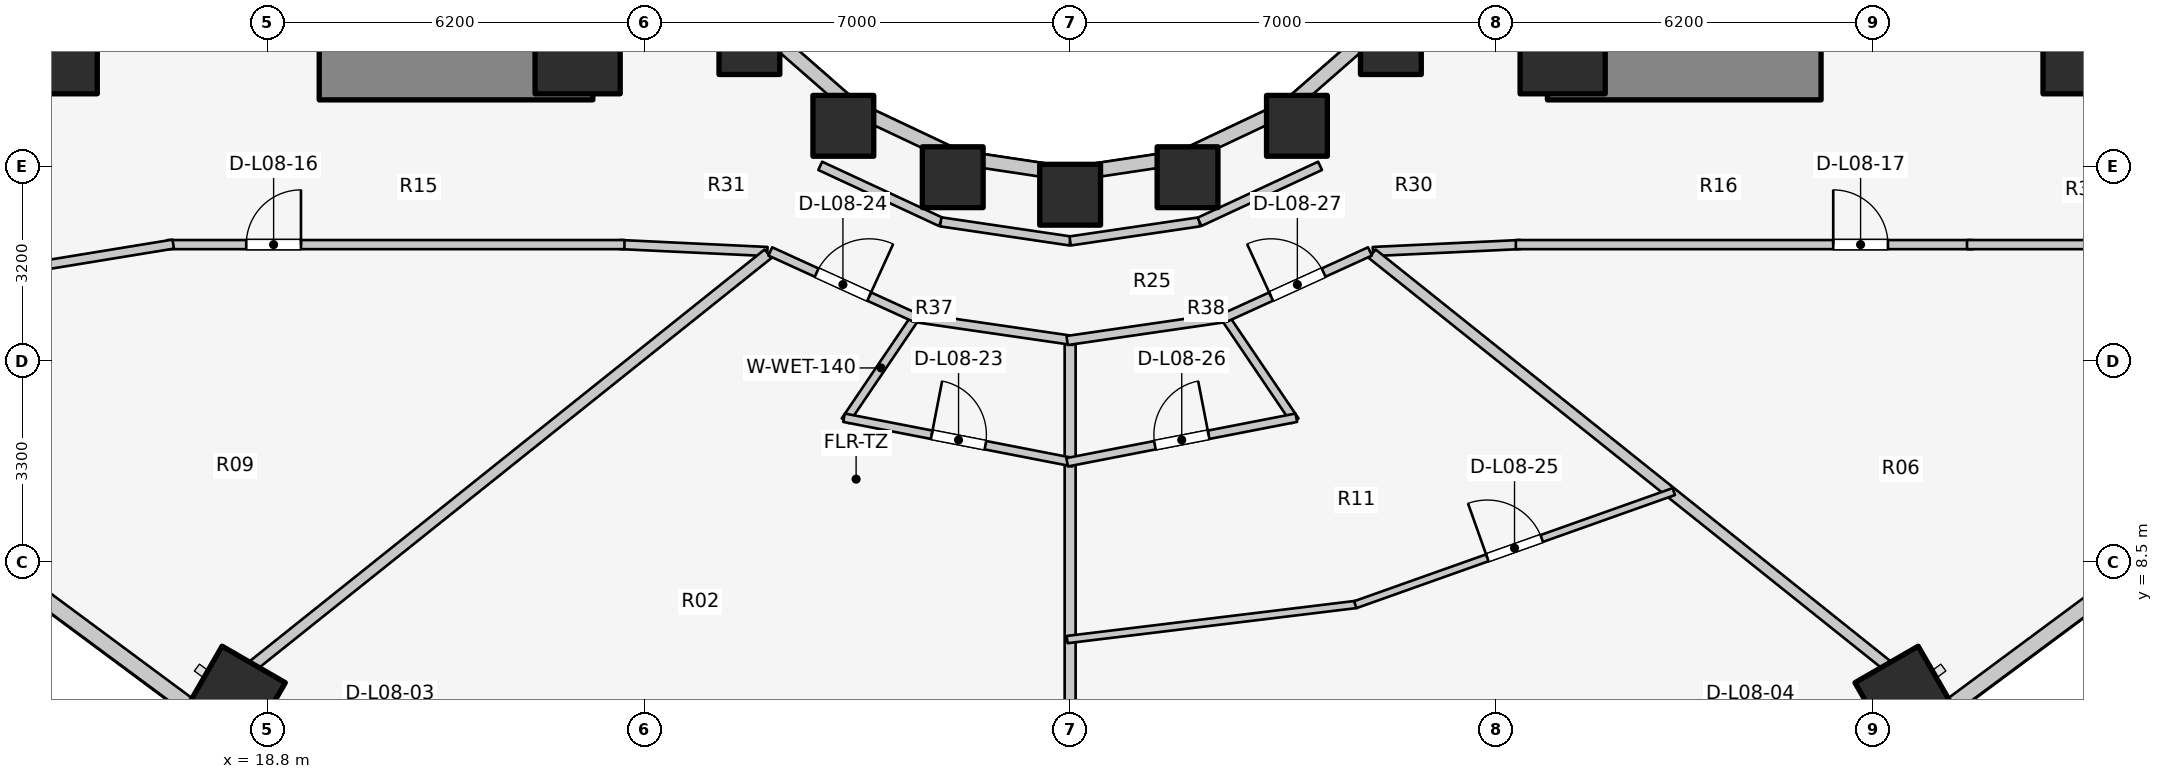
"""IFC4 building model, lengths in metres.
Left out: names, types, materials, properties, quantities, classifications, styles, units other than length and angle.
Written with IfcOpenShell. Run it as: python <this file> out.ifc"""

import sys

from ifc_helpers import new_model, si_unit, direction, frame, frame_2d, origin, origin_2d, place, context, subcontext, project, spatial, rectangle, extrude, element, fill, save


model = new_model("IFC4")
c1 = context("Model", 3, precision=1e-05, world=origin(), true_north=direction((0.0, 1.0)))
c2 = subcontext(c1, "Body", "Model", "MODEL_VIEW")
j1 = project(units=[si_unit("LENGTHUNIT", "METRE"), si_unit("PLANEANGLEUNIT", "RADIAN")], contexts=[c1])
p1 = place(None, origin())
s1 = spatial("IfcSite", under=j1, at=p1, CompositionType="ELEMENT")
p2 = place(p1, origin())
s2 = spatial("IfcBuilding", under=s1, at=p2, CompositionType="ELEMENT")
p3 = place(p2, frame((0.0, 0.0, 30.7)))
s3 = spatial("IfcBuildingStorey", under=s2, at=p3, CompositionType="ELEMENT", Elevation=30.7)
for number, where, z_axis, x_axis in (
    (1, (19.65, 16.55, 0.0), (0.0, 0.0, 1.0), (1.0, 0.0, 0.0)),
    (2, (39.85, 16.55, 0.0), (0.0, 0.0, 1.0), (1.0, 0.0, 0.0)),
):
    element("IfcWall", number, at=place(p3, frame(where, z_axis=z_axis, x_axis=x_axis)), inside=s3, PredefinedType="SHEAR", context=c2, shape_type="SweptSolid", body=[
        extrude(rectangle(XDim=4.5, YDim=0.9, at=frame_2d((2.25, 0.0))), origin(), (0.0, 0.0, 1.0), 3.1),
    ])
for number, where, z_axis, x_axis in (
    (3, (15.3, 16.9, 0.0), (0.0, 0.0, 1.0), (1.0, 0.0, 0.0)),
    (4, (23.9, 16.9, 0.0), (0.0, 0.0, 1.0), (1.0, 0.0, 0.0)),
    (5, (40.1, 16.9, 0.0), (0.0, 0.0, 1.0), (1.0, 0.0, 0.0)),
    (6, (48.7, 16.9, 0.0), (0.0, 0.0, 1.0), (1.0, 0.0, 0.0)),
):
    element("IfcColumn", number, at=place(p3, frame(where, z_axis=z_axis, x_axis=x_axis)), inside=s3, PredefinedType="COLUMN", context=c2, shape_type="SweptSolid", body=[
        extrude(rectangle(XDim=1.4, YDim=1.4, at=origin_2d()), origin(), (0.0, 0.0, 1.0), 3.1),
    ])
for number, where, z_axis, x_axis in (
    (7, (26.725, 17.018, 0.0), (0.0, 0.0, 1.0), (1.0, 0.0, 0.0)),
    (8, (28.27, 15.673, 0.0), (0.0, 0.0, 1.0), (1.0, 0.0, 0.0)),
):
    element("IfcColumn", number, at=place(p3, frame(where, z_axis=z_axis, x_axis=x_axis)), inside=s3, PredefinedType="COLUMN", context=c2, shape_type="SweptSolid", body=[
        extrude(rectangle(XDim=1.0, YDim=1.0, at=origin_2d()), origin(), (0.0, 0.0, 1.0), 3.1),
    ])
p4 = place(p3, frame((18.273, 6.296, 0.0), z_axis=(0.0, 0.0, 1.0), x_axis=(-0.5, -0.866025403784, 0.0)))
e9 = element("IfcColumn", 9, at=p4, inside=s3, PredefinedType="COLUMN", context=c2, shape_type="SweptSolid", body=[
    extrude(rectangle(XDim=1.2, YDim=1.2, at=origin_2d()), origin(), (0.0, 0.0, 1.0), 3.1),
])
for number, where, z_axis, x_axis in (
    (10, (30.069, 14.828, 0.0), (0.0, 0.0, 1.0), (1.0, 0.0, 0.0)),
    (11, (32.0, 14.54, 0.0), (0.0, 0.0, 1.0), (1.0, 0.0, 0.0)),
    (12, (33.931, 14.828, 0.0), (0.0, 0.0, 1.0), (1.0, 0.0, 0.0)),
    (13, (35.73, 15.673, 0.0), (0.0, 0.0, 1.0), (1.0, 0.0, 0.0)),
):
    element("IfcColumn", number, at=place(p3, frame(where, z_axis=z_axis, x_axis=x_axis)), inside=s3, PredefinedType="COLUMN", context=c2, shape_type="SweptSolid", body=[
        extrude(rectangle(XDim=1.0, YDim=1.0, at=origin_2d()), origin(), (0.0, 0.0, 1.0), 3.1),
    ])
p5 = place(p3, frame((45.727, 6.296, 0.0), z_axis=(0.0, 0.0, 1.0), x_axis=(0.5, -0.866025403784, 0.0)))
e14 = element("IfcColumn", 14, at=p5, inside=s3, PredefinedType="COLUMN", context=c2, shape_type="SweptSolid", body=[
    extrude(rectangle(XDim=1.2, YDim=1.2, at=origin_2d()), origin(), (0.0, 0.0, 1.0), 3.1),
])
p6 = place(p3, frame((37.275, 17.018, 0.0), z_axis=(0.0, 0.0, 1.0), x_axis=(1.0, 0.0, 0.0)))
e15 = element("IfcColumn", 15, at=p6, inside=s3, PredefinedType="COLUMN", context=c2, shape_type="SweptSolid", body=[
    extrude(rectangle(XDim=1.0, YDim=1.0, at=origin_2d()), origin(), (0.0, 0.0, 1.0), 3.1),
])
p7 = place(p3, frame((26.965, 17.258, 0.0), z_axis=(0.0, 0.0, 1.0), x_axis=(0.752576694707, -0.658504607869, 0.0)))
e16 = element("IfcWall", 16, at=p7, inside=s3, PredefinedType="STANDARD", context=c2, shape_type="SweptSolid", body=[
    extrude(rectangle(XDim=1.959, YDim=0.23, at=frame_2d((0.98, 0.0))), origin(), (0.0, 0.0, 1.0), 2.16),
])
p8 = place(p3, frame((28.44, 15.968, 0.0), z_axis=(0.0, 0.0, 1.0), x_axis=(0.904179699603, -0.427152280606, 0.0)))
e17 = element("IfcWall", 17, at=p8, inside=s3, PredefinedType="STANDARD", context=c2, shape_type="SweptSolid", body=[
    extrude(rectangle(XDim=1.899, YDim=0.23, at=frame_2d((0.95, 0.0))), origin(), (0.0, 0.0, 1.0), 2.16),
])
for number, where, z_axis, x_axis in (
    (18, (30.157, 15.157, 0.0), (0.0, 0.0, 1.0), (0.989, -0.149, 0.0)),
    (19, (32.0, 14.88, 0.0), (0.0, 0.0, 1.0), (0.989, 0.149, 0.0)),
):
    element("IfcWall", number, at=place(p3, frame(where, z_axis=z_axis, x_axis=x_axis)), inside=s3, PredefinedType="STANDARD", context=c2, shape_type="SweptSolid", body=[
        extrude(rectangle(XDim=1.864, YDim=0.23, at=frame_2d((0.932, 0.0))), origin(), (0.0, 0.0, 1.0), 2.16),
    ])
p9 = place(p3, frame((33.843, 15.157, 0.0), z_axis=(0.0, 0.0, 1.0), x_axis=(0.904179699603, 0.427152280606, 0.0)))
e20 = element("IfcWall", 20, at=p9, inside=s3, PredefinedType="STANDARD", context=c2, shape_type="SweptSolid", body=[
    extrude(rectangle(XDim=1.899, YDim=0.23, at=frame_2d((0.95, 0.0))), origin(), (0.0, 0.0, 1.0), 2.16),
])
p10 = place(p3, frame((35.56, 15.968, 0.0), z_axis=(0.0, 0.0, 1.0), x_axis=(0.752576694707, 0.658504607869, 0.0)))
e21 = element("IfcWall", 21, at=p10, inside=s3, PredefinedType="STANDARD", context=c2, shape_type="SweptSolid", body=[
    extrude(rectangle(XDim=1.959, YDim=0.23, at=frame_2d((0.98, 0.0))), origin(), (0.0, 0.0, 1.0), 2.16),
])
for number, where, z_axis, x_axis in (
    (22, (13.595, 9.035, 0.0), (0.0, 0.0, 1.0), (0.803, -0.595, 0.0)),
    (23, (46.042, 5.803, 0.0), (0.0, 0.0, 1.0), (0.803, 0.595, 0.0)),
):
    element("IfcWall", number, at=place(p3, frame(where, z_axis=z_axis, x_axis=x_axis)), inside=s3, PredefinedType="STANDARD", context=c2, shape_type="SweptSolid", body=[
        extrude(rectangle(XDim=5.43, YDim=0.26, at=frame_2d((2.715, 0.0))), origin(), (0.0, 0.0, 1.0), 2.85),
    ])
p11 = place(p3, frame((27.89, 15.015, 0.0), z_axis=(0.0, 0.0, 1.0), x_axis=(0.906943449489, -0.421252393975, 0.0)))
e24 = element("IfcWall", 24, at=p11, inside=s3, PredefinedType="PARTITIONING", context=c2, shape_type="SweptSolid", body=[
    extrude(rectangle(XDim=2.186, YDim=0.15, at=frame_2d((1.093, 0.0))), origin(), (0.0, 0.0, 1.0), 2.237),
])
for number, where, z_axis, x_axis in (
    (25, (29.873, 14.094, 0.0), (0.0, 0.0, 1.0), (0.989, -0.146, 0.0)),
    (26, (32.0, 13.78, 0.0), (0.0, 0.0, 1.0), (0.989, 0.146, 0.0)),
):
    element("IfcWall", number, at=place(p3, frame(where, z_axis=z_axis, x_axis=x_axis)), inside=s3, PredefinedType="PARTITIONING", context=c2, shape_type="SweptSolid", body=[
        extrude(rectangle(XDim=2.151, YDim=0.15, at=frame_2d((1.075, 0.0))), origin(), (0.0, 0.0, 1.0), 2.237),
    ])
p12 = place(p3, frame((34.127, 14.094, 0.0), z_axis=(0.0, 0.0, 1.0), x_axis=(0.906943449489, 0.421252393975, 0.0)))
e27 = element("IfcWall", 27, at=p12, inside=s3, PredefinedType="PARTITIONING", context=c2, shape_type="SweptSolid", body=[
    extrude(rectangle(XDim=2.186, YDim=0.15, at=frame_2d((1.093, 0.0))), origin(), (0.0, 0.0, 1.0), 2.237),
])
p13 = place(p3, frame((27.02, 13.606, 0.0), z_axis=(0.0, 0.0, 1.0), x_axis=(-0.998877427952, 0.047369651964, 0.0)))
e28 = element("IfcWall", 28, at=p13, inside=s3, PredefinedType="PARTITIONING", context=c2, shape_type="SweptSolid", body=[
    extrude(rectangle(XDim=2.433, YDim=0.15, at=frame_2d((1.216, 0.0))), origin(), (0.0, 0.0, 1.0), 2.237),
])
p14 = place(p3, frame((17.15, 13.72, 0.0), z_axis=(0.0, 0.0, 1.0), x_axis=(1.0, 0.0, 0.0)))
e29 = element("IfcWall", 29, at=p14, inside=s3, PredefinedType="PARTITIONING", context=c2, shape_type="SweptSolid", body=[
    extrude(rectangle(XDim=7.52, YDim=0.15, at=frame_2d((3.76, 0.0))), origin(), (0.0, 0.0, 1.0), 2.237),
])
p15 = place(p14, frame((1.3, 0.0, 0.0)))
e30 = element("IfcOpeningElement", 30, at=p15, cuts=e29, PredefinedType="OPENING", context=c2, shape_type="SweptSolid", body=[
    extrude(rectangle(XDim=0.9, YDim=2.1, at=frame_2d((0.45, 1.05))), frame((0.0, 0.085, 0.0), z_axis=(0.0, -1.0, 0.0), x_axis=(1.0, 0.0, 0.0)), (0.0, 0.0, 1.0), 0.17),
])
p16 = place(p3, frame((17.249, 13.728, 0.0), z_axis=(0.0, 0.0, 1.0), x_axis=(-0.98693078372, -0.161144742846, 0.0)))
e31 = element("IfcWall", 31, at=p16, inside=s3, PredefinedType="PARTITIONING", context=c2, shape_type="SweptSolid", body=[
    extrude(rectangle(XDim=7.557, YDim=0.15, at=frame_2d((3.779, 0.0))), origin(), (0.0, 0.0, 1.0), 2.069),
])
p17 = place(p3, frame((36.98, 13.606, 0.0), z_axis=(0.0, 0.0, 1.0), x_axis=(0.998877427952, 0.047369651964, 0.0)))
e32 = element("IfcWall", 32, at=p17, inside=s3, PredefinedType="PARTITIONING", context=c2, shape_type="SweptSolid", body=[
    extrude(rectangle(XDim=2.433, YDim=0.15, at=frame_2d((1.216, 0.0))), origin(), (0.0, 0.0, 1.0), 2.237),
])
p18 = place(p3, frame((39.33, 13.72, 0.0), z_axis=(0.0, 0.0, 1.0), x_axis=(1.0, 0.0, 0.0)))
e33 = element("IfcWall", 33, at=p18, inside=s3, PredefinedType="PARTITIONING", context=c2, shape_type="SweptSolid", body=[
    extrude(rectangle(XDim=7.52, YDim=0.15, at=frame_2d((3.76, 0.0))), origin(), (0.0, 0.0, 1.0), 2.237),
])
p19 = place(p18, frame((5.22, 0.0, 0.0)))
e34 = element("IfcOpeningElement", 34, at=p19, cuts=e33, PredefinedType="OPENING", context=c2, shape_type="SweptSolid", body=[
    extrude(rectangle(XDim=0.9, YDim=2.1, at=frame_2d((0.45, 1.05))), frame((0.0, 0.085, 0.0), z_axis=(0.0, -1.0, 0.0), x_axis=(1.0, 0.0, 0.0)), (0.0, 0.0, 1.0), 0.17),
])
p20 = place(p3, frame((46.75, 13.72, 0.0), z_axis=(0.0, 0.0, 1.0), x_axis=(1.0, 0.0, 0.0)))
e35 = element("IfcWall", 35, at=p20, inside=s3, PredefinedType="PARTITIONING", context=c2, shape_type="SweptSolid", body=[
    extrude(rectangle(XDim=5.05, YDim=0.15, at=frame_2d((2.525, 0.0))), origin(), (0.0, 0.0, 1.0), 2.069),
])
p21 = place(p3, frame((27.032, 13.569, 0.0), z_axis=(0.0, 0.0, 1.0), x_axis=(-0.781055486744, -0.624461629428, 0.0)))
e36 = element("IfcWall", 36, at=p21, inside=s3, PredefinedType="PARTITIONING", context=c2, shape_type="SweptSolid", body=[
    extrude(rectangle(XDim=10.843, YDim=0.18, at=frame_2d((5.422, 0.0))), origin(), (0.0, 0.0, 1.0), 2.237),
])
p22 = place(p3, frame((32.0, 12.095, 0.0), z_axis=(0.0, 0.0, 1.0), x_axis=(0.0, -1.0, 0.0)))
e37 = element("IfcWall", 37, at=p22, inside=s3, PredefinedType="PARTITIONING", context=c2, shape_type="SweptSolid", body=[
    extrude(rectangle(XDim=8.395, YDim=0.18, at=frame_2d((4.198, 0.0))), origin(), (0.0, 0.0, 1.0), 2.237),
])
p23 = place(p3, frame((36.968, 13.569, 0.0), z_axis=(0.0, 0.0, 1.0), x_axis=(0.781055486744, -0.624461629428, 0.0)))
e38 = element("IfcWall", 38, at=p23, inside=s3, PredefinedType="PARTITIONING", context=c2, shape_type="SweptSolid", body=[
    extrude(rectangle(XDim=10.843, YDim=0.18, at=frame_2d((5.422, 0.0))), origin(), (0.0, 0.0, 1.0), 2.237),
])
p24 = place(p3, frame((29.401, 12.527, 0.0), z_axis=(0.0, 0.0, 1.0), x_axis=(0.989649898776, -0.143502884474, 0.0)))
e39 = element("IfcWall", 39, at=p24, inside=s3, PredefinedType="PARTITIONING", context=c2, shape_type="SweptSolid", body=[
    extrude(rectangle(XDim=2.676, YDim=0.15, at=frame_2d((1.338, 0.0))), origin(), (0.0, 0.0, 1.0), 2.237),
])
p25 = place(p3, frame((29.479, 12.561, 0.0), z_axis=(0.0, 0.0, 1.0), x_axis=(-0.56056273171, -0.828111963335, 0.0)))
e40 = element("IfcWall", 40, at=p25, inside=s3, PredefinedType="PLUMBINGWALL", context=c2, shape_type="SweptSolid", body=[
    extrude(rectangle(XDim=2.1, YDim=0.14, at=frame_2d((1.05, 0.0))), origin(), (0.0, 0.0, 1.0), 2.855),
])
p26 = place(p3, frame((28.28, 10.873, 0.0), z_axis=(0.0, 0.0, 1.0), x_axis=(0.981623000654, -0.190830512727, 0.0)))
e41 = element("IfcWall", 41, at=p26, inside=s3, PredefinedType="PLUMBINGWALL", context=c2, shape_type="SweptSolid", body=[
    extrude(rectangle(XDim=3.839, YDim=0.14, at=frame_2d((1.92, 0.0))), origin(), (0.0, 0.0, 1.0), 2.237),
])
p27 = place(p26, frame((1.47, 0.0, 0.0)))
e42 = element("IfcOpeningElement", 42, at=p27, cuts=e41, PredefinedType="OPENING", context=c2, shape_type="SweptSolid", body=[
    extrude(rectangle(XDim=0.9, YDim=2.1, at=frame_2d((0.45, 1.05))), frame((0.0, 0.08, 0.0), z_axis=(0.0, -1.0, 0.0), x_axis=(1.0, 0.0, 0.0)), (0.0, 0.0, 1.0), 0.16),
])
p28 = place(p3, frame((27.069, 13.607, 0.0), z_axis=(0.0, 0.0, 1.0), x_axis=(0.909747571199, -0.415161843982, 0.0)))
e43 = element("IfcWall", 43, at=p28, inside=s3, PredefinedType="PARTITIONING", context=c2, shape_type="SweptSolid", body=[
    extrude(rectangle(XDim=2.625, YDim=0.15, at=frame_2d((1.312, 0.0))), origin(), (0.0, 0.0, 1.0), 2.237),
])
p29 = place(p28, frame((0.838, 0.0, 0.0)))
e44 = element("IfcOpeningElement", 44, at=p29, cuts=e43, PredefinedType="OPENING", context=c2, shape_type="SweptSolid", body=[
    extrude(rectangle(XDim=0.95, YDim=2.1, at=frame_2d((0.475, 1.05))), frame((0.0, 0.085, 0.0), z_axis=(0.0, -1.0, 0.0), x_axis=(1.0, 0.0, 0.0)), (0.0, 0.0, 1.0), 0.17),
])
p30 = place(p3, frame((31.95, 7.225, 0.0), z_axis=(0.0, 0.0, 1.0), x_axis=(0.992699076447, 0.120617343785, 0.0)))
e45 = element("IfcWall", 45, at=p30, inside=s3, PredefinedType="MOVABLE", context=c2, shape_type="SweptSolid", body=[
    extrude(rectangle(XDim=4.793, YDim=0.12, at=frame_2d((2.396, 0.0))), origin(), (0.0, 0.0, 1.0), 2.237),
])
p31 = place(p3, frame((36.689, 7.798, 0.0), z_axis=(0.0, 0.0, 1.0), x_axis=(0.942369240096, 0.334574678243, 0.0)))
e46 = element("IfcWall", 46, at=p31, inside=s3, PredefinedType="MOVABLE", context=c2, shape_type="SweptSolid", body=[
    extrude(rectangle(XDim=5.559, YDim=0.12, at=frame_2d((2.779, 0.0))), origin(), (0.0, 0.0, 1.0), 2.237),
])
p32 = place(p31, frame((2.304, 0.0, 0.0)))
e47 = element("IfcOpeningElement", 47, at=p32, cuts=e46, PredefinedType="OPENING", context=c2, shape_type="SweptSolid", body=[
    extrude(rectangle(XDim=0.95, YDim=2.1, at=frame_2d((0.475, 1.05))), frame((0.0, 0.07, 0.0), z_axis=(0.0, -1.0, 0.0), x_axis=(1.0, 0.0, 0.0)), (0.0, 0.0, 1.0), 0.14),
])
p33 = place(p3, frame((31.95, 12.143, 0.0), z_axis=(0.0, 0.0, 1.0), x_axis=(0.989649898776, 0.143502884474, 0.0)))
e48 = element("IfcWall", 48, at=p33, inside=s3, PredefinedType="PARTITIONING", context=c2, shape_type="SweptSolid", body=[
    extrude(rectangle(XDim=2.676, YDim=0.15, at=frame_2d((1.338, 0.0))), origin(), (0.0, 0.0, 1.0), 2.237),
])
p34 = place(p3, frame((34.521, 12.561, 0.0), z_axis=(0.0, 0.0, 1.0), x_axis=(0.56056273171, -0.828111963335, 0.0)))
e49 = element("IfcWall", 49, at=p34, inside=s3, PredefinedType="PLUMBINGWALL", context=c2, shape_type="SweptSolid", body=[
    extrude(rectangle(XDim=2.1, YDim=0.14, at=frame_2d((1.05, 0.0))), origin(), (0.0, 0.0, 1.0), 2.855),
])
p35 = place(p3, frame((31.951, 10.14, 0.0), z_axis=(0.0, 0.0, 1.0), x_axis=(0.981623000654, 0.190830512727, 0.0)))
e50 = element("IfcWall", 50, at=p35, inside=s3, PredefinedType="PLUMBINGWALL", context=c2, shape_type="SweptSolid", body=[
    extrude(rectangle(XDim=3.839, YDim=0.14, at=frame_2d((1.92, 0.0))), origin(), (0.0, 0.0, 1.0), 2.237),
])
p36 = place(p35, frame((1.47, 0.0, 0.0)))
e51 = element("IfcOpeningElement", 51, at=p36, cuts=e50, PredefinedType="OPENING", context=c2, shape_type="SweptSolid", body=[
    extrude(rectangle(XDim=0.9, YDim=2.1, at=frame_2d((0.45, 1.05))), frame((0.0, 0.08, 0.0), z_axis=(0.0, -1.0, 0.0), x_axis=(1.0, 0.0, 0.0)), (0.0, 0.0, 1.0), 0.16),
])
p37 = place(p3, frame((34.543, 12.518, 0.0), z_axis=(0.0, 0.0, 1.0), x_axis=(0.909747571199, 0.415161843982, 0.0)))
e52 = element("IfcWall", 52, at=p37, inside=s3, PredefinedType="PARTITIONING", context=c2, shape_type="SweptSolid", body=[
    extrude(rectangle(XDim=2.625, YDim=0.15, at=frame_2d((1.312, 0.0))), origin(), (0.0, 0.0, 1.0), 2.237),
])
p38 = place(p37, frame((0.838, 0.0, 0.0)))
e53 = element("IfcOpeningElement", 53, at=p38, cuts=e52, PredefinedType="OPENING", context=c2, shape_type="SweptSolid", body=[
    extrude(rectangle(XDim=0.95, YDim=2.1, at=frame_2d((0.475, 1.05))), frame((0.0, 0.085, 0.0), z_axis=(0.0, -1.0, 0.0), x_axis=(1.0, 0.0, 0.0)), (0.0, 0.0, 1.0), 0.17),
])
p39 = place(p15, origin())
e54 = element("IfcDoor", 54, at=p39, inside=s3, OperationType="SINGLE_SWING_RIGHT", PredefinedType="DOOR", context=c2, shape_type="SweptSolid", body=[
    extrude(rectangle(XDim=0.9, YDim=2.1, at=frame_2d((0.45, 1.05))), frame((0.0, 0.025, 0.0), z_axis=(0.0, -1.0, 0.0), x_axis=(1.0, 0.0, 0.0)), (0.0, 0.0, 1.0), 0.05),
])
fill(e30, e54)
p40 = place(p19, origin())
e55 = element("IfcDoor", 55, at=p40, inside=s3, OperationType="SINGLE_SWING_LEFT", PredefinedType="DOOR", context=c2, shape_type="SweptSolid", body=[
    extrude(rectangle(XDim=0.9, YDim=2.1, at=frame_2d((0.45, 1.05))), frame((0.0, 0.025, 0.0), z_axis=(0.0, -1.0, 0.0), x_axis=(1.0, 0.0, 0.0)), (0.0, 0.0, 1.0), 0.05),
])
fill(e34, e55)
p41 = place(p27, origin())
e56 = element("IfcDoor", 56, at=p41, inside=s3, OperationType="SINGLE_SWING_LEFT", PredefinedType="DOOR", context=c2, shape_type="SweptSolid", body=[
    extrude(rectangle(XDim=0.9, YDim=2.1, at=frame_2d((0.45, 1.05))), frame((0.0, 0.025, 0.0), z_axis=(0.0, -1.0, 0.0), x_axis=(1.0, 0.0, 0.0)), (0.0, 0.0, 1.0), 0.05),
])
fill(e42, e56)
p42 = place(p29, origin())
e57 = element("IfcDoor", 57, at=p42, inside=s3, OperationType="SINGLE_SWING_RIGHT", PredefinedType="DOOR", context=c2, shape_type="SweptSolid", body=[
    extrude(rectangle(XDim=0.95, YDim=2.1, at=frame_2d((0.475, 1.05))), frame((0.0, 0.025, 0.0), z_axis=(0.0, -1.0, 0.0), x_axis=(1.0, 0.0, 0.0)), (0.0, 0.0, 1.0), 0.05),
])
fill(e44, e57)
p43 = place(p32, origin())
e58 = element("IfcDoor", 58, at=p43, inside=s3, OperationType="SINGLE_SWING_LEFT", PredefinedType="DOOR", context=c2, shape_type="SweptSolid", body=[
    extrude(rectangle(XDim=0.95, YDim=2.1, at=frame_2d((0.475, 1.05))), frame((0.0, 0.025, 0.0), z_axis=(0.0, -1.0, 0.0), x_axis=(1.0, 0.0, 0.0)), (0.0, 0.0, 1.0), 0.05),
])
fill(e47, e58)
p44 = place(p36, origin())
e59 = element("IfcDoor", 59, at=p44, inside=s3, OperationType="SINGLE_SWING_RIGHT", PredefinedType="DOOR", context=c2, shape_type="SweptSolid", body=[
    extrude(rectangle(XDim=0.9, YDim=2.1, at=frame_2d((0.45, 1.05))), frame((0.0, 0.025, 0.0), z_axis=(0.0, -1.0, 0.0), x_axis=(1.0, 0.0, 0.0)), (0.0, 0.0, 1.0), 0.05),
])
fill(e51, e59)
p45 = place(p38, origin())
e60 = element("IfcDoor", 60, at=p45, inside=s3, OperationType="SINGLE_SWING_LEFT", PredefinedType="DOOR", context=c2, shape_type="SweptSolid", body=[
    extrude(rectangle(XDim=0.95, YDim=2.1, at=frame_2d((0.475, 1.05))), frame((0.0, 0.025, 0.0), z_axis=(0.0, -1.0, 0.0), x_axis=(1.0, 0.0, 0.0)), (0.0, 0.0, 1.0), 0.05),
])
fill(e53, e60)
save(model, sys.argv[1])
